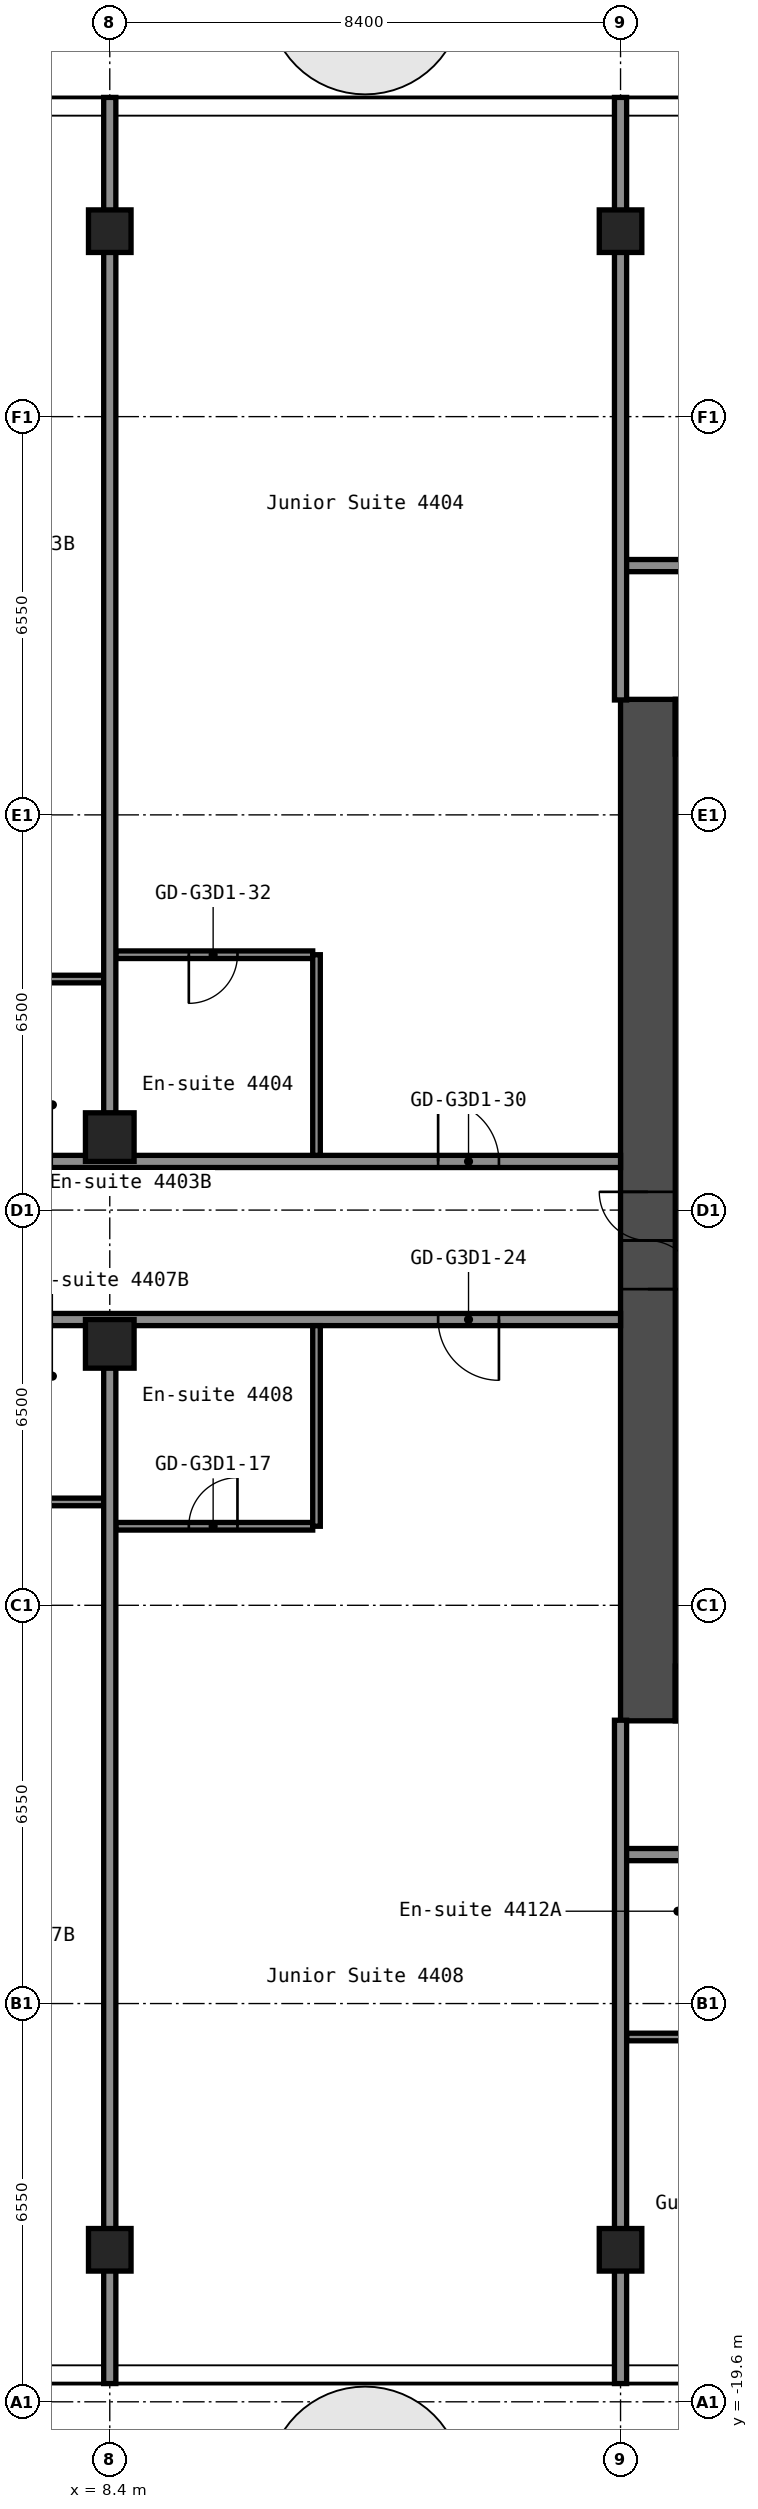
"""IFC4 building model, lengths in metres.
Left out: names, types, materials, properties, quantities, classifications, styles, units other than length and angle.
Written with IfcOpenShell. Run it as: python <this file> out.ifc"""

import sys

from ifc_helpers import new_model, si_unit, direction, frame, frame_2d, origin, origin_2d, place, context, subcontext, project, spatial, rectangle, hollow_rectangle, extrude, element, fill, save


model = new_model("IFC4")
c1 = context("Model", 3, precision=1e-05, world=origin(), true_north=direction((0.0, 1.0)))
c2 = subcontext(c1, "Body", "Model", "MODEL_VIEW")
j1 = project(units=[si_unit("LENGTHUNIT", "METRE"), si_unit("PLANEANGLEUNIT", "RADIAN")], contexts=[c1])
p1 = place(None, origin())
s1 = spatial("IfcSite", under=j1, at=p1, CompositionType="ELEMENT")
p2 = place(p1, origin())
s2 = spatial("IfcBuilding", under=s1, at=p2, CompositionType="ELEMENT")
p3 = place(p2, frame((0.0, 0.0, 156.6)))
s3 = spatial("IfcBuildingStorey", under=s2, at=p3, CompositionType="ELEMENT", Elevation=156.6)
p4 = place(p3, frame((8.4, -17.1, 0.0), z_axis=(0.0, 0.0, 1.0), x_axis=(1.0, 0.0, 0.0)))
e1 = element("IfcColumn", 1, at=p4, inside=s3, PredefinedType="COLUMN", context=c2, shape_type="SweptSolid", body=[
    extrude(hollow_rectangle(XDim=0.7, YDim=0.7, WallThickness=0.028, at=origin_2d()), origin(), (0.0, 0.0, 1.0), 2.75),
])
for number, where, z_axis, x_axis in (
    (2, (8.4, -2.2, 0.0), (0.0, 0.0, 1.0), (1.0, 0.0, 0.0)),
    (3, (8.4, 1.2, 0.0), (0.0, 0.0, 1.0), (1.0, 0.0, 0.0)),
):
    element("IfcColumn", number, at=place(p3, frame(where, z_axis=z_axis, x_axis=x_axis)), inside=s3, PredefinedType="COLUMN", context=c2, shape_type="SweptSolid", body=[
        extrude(hollow_rectangle(XDim=0.8, YDim=0.8, WallThickness=0.032, at=origin_2d()), origin(), (0.0, 0.0, 1.0), 2.75),
    ])
for number, where, z_axis, x_axis in (
    (4, (8.4, 16.1, 0.0), (0.0, 0.0, 1.0), (1.0, 0.0, 0.0)),
    (5, (16.8, -17.1, 0.0), (0.0, 0.0, 1.0), (1.0, 0.0, 0.0)),
    (6, (16.8, 16.1, 0.0), (0.0, 0.0, 1.0), (1.0, 0.0, 0.0)),
):
    element("IfcColumn", number, at=place(p3, frame(where, z_axis=z_axis, x_axis=x_axis)), inside=s3, PredefinedType="COLUMN", context=c2, shape_type="SweptSolid", body=[
        extrude(hollow_rectangle(XDim=0.7, YDim=0.7, WallThickness=0.028, at=origin_2d()), origin(), (0.0, 0.0, 1.0), 2.75),
    ])
p5 = place(p3, frame((17.25, -8.4, 0.0), z_axis=(0.0, 0.0, 1.0), x_axis=(0.0, 1.0, 0.0)))
e7 = element("IfcWall", 7, at=p5, inside=s3, PredefinedType="SHEAR", context=c2, shape_type="SweptSolid", body=[
    extrude(rectangle(XDim=16.8, YDim=0.9, at=frame_2d((8.4, 0.0))), origin(), (0.0, 0.0, 1.0), 2.75),
])
p6 = place(p5, frame((7.1, 0.0, 0.0)))
e8 = element("IfcOpeningElement", 8, at=p6, cuts=e7, PredefinedType="OPENING", context=c2, shape_type="SweptSolid", body=[
    extrude(rectangle(XDim=1.6, YDim=2.1, at=frame_2d((0.8, 1.05))), frame((0.0, 0.46, 0.0), z_axis=(0.0, -1.0, 0.0), x_axis=(1.0, 0.0, 0.0)), (0.0, 0.0, 1.0), 0.92),
])
p7 = place(p3, frame((17.7, 7.95, 0.0), z_axis=(0.0, 0.0, 1.0), x_axis=(1.0, 0.0, 0.0)))
e9 = element("IfcWall", 9, at=p7, inside=s3, PredefinedType="SHEAR", context=c2, shape_type="SweptSolid", body=[
    extrude(rectangle(XDim=15.0, YDim=0.9, at=frame_2d((7.5, 0.0))), origin(), (0.0, 0.0, 1.0), 2.75),
])
p8 = place(p7, frame((10.4, 0.0, 0.0)))
e10 = element("IfcOpeningElement", 10, at=p8, cuts=e9, PredefinedType="OPENING", context=c2, shape_type="SweptSolid", body=[
    extrude(rectangle(XDim=1.2, YDim=2.1, at=frame_2d((0.6, 1.05))), frame((0.0, 0.46, 0.0), z_axis=(0.0, -1.0, 0.0), x_axis=(1.0, 0.0, 0.0)), (0.0, 0.0, 1.0), 0.92),
])
p9 = place(p7, frame((13.35, 0.0, 0.0)))
e11 = element("IfcOpeningElement", 11, at=p9, cuts=e9, PredefinedType="OPENING", context=c2, shape_type="SweptSolid", body=[
    extrude(rectangle(XDim=0.9, YDim=2.1, at=frame_2d((0.45, 1.05))), frame((0.0, 0.46, 0.0), z_axis=(0.0, -1.0, 0.0), x_axis=(1.0, 0.0, 0.0)), (0.0, 0.0, 1.0), 0.92),
])
p10 = place(p3, frame((17.7, -7.95, 0.0), z_axis=(0.0, 0.0, 1.0), x_axis=(1.0, 0.0, 0.0)))
e12 = element("IfcWall", 12, at=p10, inside=s3, PredefinedType="SHEAR", context=c2, shape_type="SweptSolid", body=[
    extrude(rectangle(XDim=15.0, YDim=0.9, at=frame_2d((7.5, 0.0))), origin(), (0.0, 0.0, 1.0), 2.75),
])
p11 = place(p10, frame((2.55, 0.0, 0.0)))
e13 = element("IfcOpeningElement", 13, at=p11, cuts=e12, PredefinedType="OPENING", context=c2, shape_type="SweptSolid", body=[
    extrude(rectangle(XDim=1.0, YDim=2.1, at=frame_2d((0.5, 1.05))), frame((0.0, 0.46, 0.0), z_axis=(0.0, -1.0, 0.0), x_axis=(1.0, 0.0, 0.0)), (0.0, 0.0, 1.0), 0.92),
])
p12 = place(p3, frame((16.9, -13.6, 0.0), z_axis=(0.0, 0.0, 1.0), x_axis=(1.0, 0.0, 0.0)))
e14 = element("IfcWall", 14, at=p12, inside=s3, PredefinedType="PARTITIONING", context=c2, shape_type="SweptSolid", body=[
    extrude(rectangle(XDim=2.338, YDim=0.125, at=frame_2d((1.169, 0.0))), origin(), (0.0, 0.0, 1.0), 2.75),
])
p13 = place(p3, frame((16.8, -10.6, 0.0), z_axis=(0.0, 0.0, 1.0), x_axis=(1.0, 0.0, 0.0)))
e15 = element("IfcWall", 15, at=p13, inside=s3, PredefinedType="PARTITIONING", context=c2, shape_type="SweptSolid", body=[
    extrude(rectangle(XDim=25.9, YDim=0.2, at=frame_2d((12.95, 0.0))), origin(), (0.0, 0.0, 1.0), 2.75),
])
p14 = place(p13, frame((2.85, 0.0, 0.0)))
e16 = element("IfcOpeningElement", 16, at=p14, cuts=e15, PredefinedType="OPENING", context=c2, shape_type="SweptSolid", body=[
    extrude(rectangle(XDim=1.0, YDim=2.1, at=frame_2d((0.5, 1.05))), frame((0.0, 0.11, 0.0), z_axis=(0.0, -1.0, 0.0), x_axis=(1.0, 0.0, 0.0)), (0.0, 0.0, 1.0), 0.22),
])
p15 = place(p13, frame((4.55, 0.0, 0.0)))
e17 = element("IfcOpeningElement", 17, at=p15, cuts=e15, PredefinedType="OPENING", context=c2, shape_type="SweptSolid", body=[
    extrude(rectangle(XDim=1.0, YDim=2.1, at=frame_2d((0.5, 1.05))), frame((0.0, 0.11, 0.0), z_axis=(0.0, -1.0, 0.0), x_axis=(1.0, 0.0, 0.0)), (0.0, 0.0, 1.0), 0.22),
])
p16 = place(p13, frame((13.8, 0.0, 0.0)))
e18 = element("IfcOpeningElement", 18, at=p16, cuts=e15, PredefinedType="OPENING", context=c2, shape_type="SweptSolid", body=[
    extrude(rectangle(XDim=1.0, YDim=2.1, at=frame_2d((0.5, 1.05))), frame((0.0, 0.11, 0.0), z_axis=(0.0, -1.0, 0.0), x_axis=(1.0, 0.0, 0.0)), (0.0, 0.0, 1.0), 0.22),
])
p17 = place(p13, frame((19.75, 0.0, 0.0)))
e19 = element("IfcOpeningElement", 19, at=p17, cuts=e15, PredefinedType="OPENING", context=c2, shape_type="SweptSolid", body=[
    extrude(rectangle(XDim=1.0, YDim=2.1, at=frame_2d((0.5, 1.05))), frame((0.0, 0.11, 0.0), z_axis=(0.0, -1.0, 0.0), x_axis=(1.0, 0.0, 0.0)), (0.0, 0.0, 1.0), 0.22),
])
p18 = place(p13, frame((21.65, 0.0, 0.0)))
e20 = element("IfcOpeningElement", 20, at=p18, cuts=e15, PredefinedType="OPENING", context=c2, shape_type="SweptSolid", body=[
    extrude(rectangle(XDim=1.0, YDim=2.1, at=frame_2d((0.5, 1.05))), frame((0.0, 0.11, 0.0), z_axis=(0.0, -1.0, 0.0), x_axis=(1.0, 0.0, 0.0)), (0.0, 0.0, 1.0), 0.22),
])
p19 = place(p3, frame((8.5, -5.2, 0.0), z_axis=(0.0, 0.0, 1.0), x_axis=(1.0, 0.0, 0.0)))
e21 = element("IfcWall", 21, at=p19, inside=s3, PredefinedType="PARTITIONING", context=c2, shape_type="SweptSolid", body=[
    extrude(rectangle(XDim=3.238, YDim=0.125, at=frame_2d((1.619, 0.0))), origin(), (0.0, 0.0, 1.0), 2.75),
])
p20 = place(p19, frame((1.2, 0.0, 0.0)))
e22 = element("IfcOpeningElement", 22, at=p20, cuts=e21, PredefinedType="OPENING", context=c2, shape_type="SweptSolid", body=[
    extrude(rectangle(XDim=0.8, YDim=2.1, at=frame_2d((0.4, 1.05))), frame((0.0, 0.073, 0.0), z_axis=(0.0, -1.0, 0.0), x_axis=(1.0, 0.0, 0.0)), (0.0, 0.0, 1.0), 0.145),
])
p21 = place(p3, frame((5.962, -4.8, 0.0), z_axis=(0.0, 0.0, 1.0), x_axis=(1.0, 0.0, 0.0)))
e23 = element("IfcWall", 23, at=p21, inside=s3, PredefinedType="PARTITIONING", context=c2, shape_type="SweptSolid", body=[
    extrude(rectangle(XDim=2.338, YDim=0.125, at=frame_2d((1.169, 0.0))), origin(), (0.0, 0.0, 1.0), 2.75),
])
p22 = place(p3, frame((-16.8, -1.8, 0.0), z_axis=(0.0, 0.0, 1.0), x_axis=(1.0, 0.0, 0.0)))
e24 = element("IfcWall", 24, at=p22, inside=s3, PredefinedType="PARTITIONING", context=c2, shape_type="SweptSolid", body=[
    extrude(rectangle(XDim=33.6, YDim=0.2, at=frame_2d((16.8, 0.0))), origin(), (0.0, 0.0, 1.0), 2.75),
])
p23 = place(p22, frame((2.85, 0.0, 0.0)))
e25 = element("IfcOpeningElement", 25, at=p23, cuts=e24, PredefinedType="OPENING", context=c2, shape_type="SweptSolid", body=[
    extrude(rectangle(XDim=1.0, YDim=2.1, at=frame_2d((0.5, 1.05))), frame((0.0, 0.11, 0.0), z_axis=(0.0, -1.0, 0.0), x_axis=(1.0, 0.0, 0.0)), (0.0, 0.0, 1.0), 0.22),
])
p24 = place(p22, frame((4.55, 0.0, 0.0)))
e26 = element("IfcOpeningElement", 26, at=p24, cuts=e24, PredefinedType="OPENING", context=c2, shape_type="SweptSolid", body=[
    extrude(rectangle(XDim=1.0, YDim=2.1, at=frame_2d((0.5, 1.05))), frame((0.0, 0.11, 0.0), z_axis=(0.0, -1.0, 0.0), x_axis=(1.0, 0.0, 0.0)), (0.0, 0.0, 1.0), 0.22),
])
p25 = place(p22, frame((10.385, 0.0, 0.0)))
e27 = element("IfcOpeningElement", 27, at=p25, cuts=e24, PredefinedType="OPENING", context=c2, shape_type="SweptSolid", body=[
    extrude(rectangle(XDim=0.9, YDim=2.1, at=frame_2d((0.45, 1.05))), frame((0.0, 0.11, 0.0), z_axis=(0.0, -1.0, 0.0), x_axis=(1.0, 0.0, 0.0)), (0.0, 0.0, 1.0), 0.22),
])
p26 = place(p22, frame((14.585, 0.0, 0.0)))
e28 = element("IfcOpeningElement", 28, at=p26, cuts=e24, PredefinedType="OPENING", context=c2, shape_type="SweptSolid", body=[
    extrude(rectangle(XDim=0.9, YDim=2.1, at=frame_2d((0.45, 1.05))), frame((0.0, 0.11, 0.0), z_axis=(0.0, -1.0, 0.0), x_axis=(1.0, 0.0, 0.0)), (0.0, 0.0, 1.0), 0.22),
])
p27 = place(p22, frame((19.65, 0.0, 0.0)))
e29 = element("IfcOpeningElement", 29, at=p27, cuts=e24, PredefinedType="OPENING", context=c2, shape_type="SweptSolid", body=[
    extrude(rectangle(XDim=1.0, YDim=2.1, at=frame_2d((0.5, 1.05))), frame((0.0, 0.11, 0.0), z_axis=(0.0, -1.0, 0.0), x_axis=(1.0, 0.0, 0.0)), (0.0, 0.0, 1.0), 0.22),
])
p28 = place(p22, frame((21.35, 0.0, 0.0)))
e30 = element("IfcOpeningElement", 30, at=p28, cuts=e24, PredefinedType="OPENING", context=c2, shape_type="SweptSolid", body=[
    extrude(rectangle(XDim=1.0, YDim=2.1, at=frame_2d((0.5, 1.05))), frame((0.0, 0.11, 0.0), z_axis=(0.0, -1.0, 0.0), x_axis=(1.0, 0.0, 0.0)), (0.0, 0.0, 1.0), 0.22),
])
p29 = place(p22, frame((30.6, 0.0, 0.0)))
e31 = element("IfcOpeningElement", 31, at=p29, cuts=e24, PredefinedType="OPENING", context=c2, shape_type="SweptSolid", body=[
    extrude(rectangle(XDim=1.0, YDim=2.1, at=frame_2d((0.5, 1.05))), frame((0.0, 0.11, 0.0), z_axis=(0.0, -1.0, 0.0), x_axis=(1.0, 0.0, 0.0)), (0.0, 0.0, 1.0), 0.22),
])
p30 = place(p3, frame((-16.8, 0.8, 0.0), z_axis=(0.0, 0.0, 1.0), x_axis=(1.0, 0.0, 0.0)))
e32 = element("IfcWall", 32, at=p30, inside=s3, PredefinedType="PARTITIONING", context=c2, shape_type="SweptSolid", body=[
    extrude(rectangle(XDim=33.6, YDim=0.2, at=frame_2d((16.8, 0.0))), origin(), (0.0, 0.0, 1.0), 2.75),
])
p31 = place(p30, frame((2.85, 0.0, 0.0)))
e33 = element("IfcOpeningElement", 33, at=p31, cuts=e32, PredefinedType="OPENING", context=c2, shape_type="SweptSolid", body=[
    extrude(rectangle(XDim=1.0, YDim=2.1, at=frame_2d((0.5, 1.05))), frame((0.0, 0.11, 0.0), z_axis=(0.0, -1.0, 0.0), x_axis=(1.0, 0.0, 0.0)), (0.0, 0.0, 1.0), 0.22),
])
p32 = place(p30, frame((4.55, 0.0, 0.0)))
e34 = element("IfcOpeningElement", 34, at=p32, cuts=e32, PredefinedType="OPENING", context=c2, shape_type="SweptSolid", body=[
    extrude(rectangle(XDim=1.0, YDim=2.1, at=frame_2d((0.5, 1.05))), frame((0.0, 0.11, 0.0), z_axis=(0.0, -1.0, 0.0), x_axis=(1.0, 0.0, 0.0)), (0.0, 0.0, 1.0), 0.22),
])
p33 = place(p30, frame((10.4, 0.0, 0.0)))
e35 = element("IfcOpeningElement", 35, at=p33, cuts=e32, PredefinedType="OPENING", context=c2, shape_type="SweptSolid", body=[
    extrude(rectangle(XDim=1.0, YDim=2.1, at=frame_2d((0.5, 1.05))), frame((0.0, 0.11, 0.0), z_axis=(0.0, -1.0, 0.0), x_axis=(1.0, 0.0, 0.0)), (0.0, 0.0, 1.0), 0.22),
])
p34 = place(p30, frame((19.65, 0.0, 0.0)))
e36 = element("IfcOpeningElement", 36, at=p34, cuts=e32, PredefinedType="OPENING", context=c2, shape_type="SweptSolid", body=[
    extrude(rectangle(XDim=1.0, YDim=2.1, at=frame_2d((0.5, 1.05))), frame((0.0, 0.11, 0.0), z_axis=(0.0, -1.0, 0.0), x_axis=(1.0, 0.0, 0.0)), (0.0, 0.0, 1.0), 0.22),
])
p35 = place(p30, frame((21.35, 0.0, 0.0)))
e37 = element("IfcOpeningElement", 37, at=p35, cuts=e32, PredefinedType="OPENING", context=c2, shape_type="SweptSolid", body=[
    extrude(rectangle(XDim=1.0, YDim=2.1, at=frame_2d((0.5, 1.05))), frame((0.0, 0.11, 0.0), z_axis=(0.0, -1.0, 0.0), x_axis=(1.0, 0.0, 0.0)), (0.0, 0.0, 1.0), 0.22),
])
p36 = place(p30, frame((30.6, 0.0, 0.0)))
e38 = element("IfcOpeningElement", 38, at=p36, cuts=e32, PredefinedType="OPENING", context=c2, shape_type="SweptSolid", body=[
    extrude(rectangle(XDim=1.0, YDim=2.1, at=frame_2d((0.5, 1.05))), frame((0.0, 0.11, 0.0), z_axis=(0.0, -1.0, 0.0), x_axis=(1.0, 0.0, 0.0)), (0.0, 0.0, 1.0), 0.22),
])
p37 = place(p3, frame((5.962, 3.8, 0.0), z_axis=(0.0, 0.0, 1.0), x_axis=(1.0, 0.0, 0.0)))
e39 = element("IfcWall", 39, at=p37, inside=s3, PredefinedType="PARTITIONING", context=c2, shape_type="SweptSolid", body=[
    extrude(rectangle(XDim=2.338, YDim=0.125, at=frame_2d((1.169, 0.0))), origin(), (0.0, 0.0, 1.0), 2.75),
])
p38 = place(p3, frame((8.5, 4.2, 0.0), z_axis=(0.0, 0.0, 1.0), x_axis=(1.0, 0.0, 0.0)))
e40 = element("IfcWall", 40, at=p38, inside=s3, PredefinedType="PARTITIONING", context=c2, shape_type="SweptSolid", body=[
    extrude(rectangle(XDim=3.238, YDim=0.125, at=frame_2d((1.619, 0.0))), origin(), (0.0, 0.0, 1.0), 2.75),
])
p39 = place(p38, frame((1.2, 0.0, 0.0)))
e41 = element("IfcOpeningElement", 41, at=p39, cuts=e40, PredefinedType="OPENING", context=c2, shape_type="SweptSolid", body=[
    extrude(rectangle(XDim=0.8, YDim=2.1, at=frame_2d((0.4, 1.05))), frame((0.0, 0.073, 0.0), z_axis=(0.0, -1.0, 0.0), x_axis=(1.0, 0.0, 0.0)), (0.0, 0.0, 1.0), 0.145),
])
p40 = place(p3, frame((16.8, 10.6, 0.0), z_axis=(0.0, 0.0, 1.0), x_axis=(1.0, 0.0, 0.0)))
e42 = element("IfcWall", 42, at=p40, inside=s3, PredefinedType="PARTITIONING", context=c2, shape_type="SweptSolid", body=[
    extrude(rectangle(XDim=25.9, YDim=0.2, at=frame_2d((12.95, 0.0))), origin(), (0.0, 0.0, 1.0), 2.75),
])
p41 = place(p40, frame((3.4, 0.0, 0.0)))
e43 = element("IfcOpeningElement", 43, at=p41, cuts=e42, PredefinedType="OPENING", context=c2, shape_type="SweptSolid", body=[
    extrude(rectangle(XDim=1.6, YDim=2.1, at=frame_2d((0.8, 1.05))), frame((0.0, 0.11, 0.0), z_axis=(0.0, -1.0, 0.0), x_axis=(1.0, 0.0, 0.0)), (0.0, 0.0, 1.0), 0.22),
])
p42 = place(p40, frame((11.8, 0.0, 0.0)))
e44 = element("IfcOpeningElement", 44, at=p42, cuts=e42, PredefinedType="OPENING", context=c2, shape_type="SweptSolid", body=[
    extrude(rectangle(XDim=1.6, YDim=2.1, at=frame_2d((0.8, 1.05))), frame((0.0, 0.11, 0.0), z_axis=(0.0, -1.0, 0.0), x_axis=(1.0, 0.0, 0.0)), (0.0, 0.0, 1.0), 0.22),
])
p43 = place(p40, frame((20.4, 0.0, 0.0)))
e45 = element("IfcOpeningElement", 45, at=p43, cuts=e42, PredefinedType="OPENING", context=c2, shape_type="SweptSolid", body=[
    extrude(rectangle(XDim=1.6, YDim=2.1, at=frame_2d((0.8, 1.05))), frame((0.0, 0.11, 0.0), z_axis=(0.0, -1.0, 0.0), x_axis=(1.0, 0.0, 0.0)), (0.0, 0.0, 1.0), 0.22),
])
for number, where, z_axis, x_axis in (
    (46, (8.4, -19.3, 0.0), (0.0, 0.0, 1.0), (0.0, 1.0, 0.0)),
    (47, (8.4, 1.59, 0.0), (0.0, 0.0, 1.0), (0.0, 1.0, 0.0)),
):
    element("IfcWall", number, at=place(p3, frame(where, z_axis=z_axis, x_axis=x_axis)), inside=s3, PredefinedType="PARTITIONING", context=c2, shape_type="SweptSolid", body=[
        extrude(rectangle(XDim=16.71, YDim=0.2, at=frame_2d((8.355, 0.0))), origin(), (0.0, 0.0, 1.0), 2.75),
    ])
for number, where, z_axis, x_axis in (
    (48, (11.8, -5.2, 0.0), (0.0, 0.0, 1.0), (0.0, 1.0, 0.0)),
    (49, (11.8, 0.9, 0.0), (0.0, 0.0, 1.0), (0.0, 1.0, 0.0)),
):
    element("IfcWall", number, at=place(p3, frame(where, z_axis=z_axis, x_axis=x_axis)), inside=s3, PredefinedType="PARTITIONING", context=c2, shape_type="SweptSolid", body=[
        extrude(rectangle(XDim=3.3, YDim=0.125, at=frame_2d((1.65, 0.0))), origin(), (0.0, 0.0, 1.0), 2.75),
    ])
p44 = place(p3, frame((16.8, -19.3, 0.0), z_axis=(0.0, 0.0, 1.0), x_axis=(0.0, 1.0, 0.0)))
e50 = element("IfcWall", 50, at=p44, inside=s3, PredefinedType="PARTITIONING", context=c2, shape_type="SweptSolid", body=[
    extrude(rectangle(XDim=10.91, YDim=0.2, at=frame_2d((5.455, 0.0))), origin(), (0.0, 0.0, 1.0), 2.75),
])
p45 = place(p3, frame((16.8, 8.39, 0.0), z_axis=(0.0, 0.0, 1.0), x_axis=(0.0, 1.0, 0.0)))
e51 = element("IfcWall", 51, at=p45, inside=s3, PredefinedType="PARTITIONING", context=c2, shape_type="SweptSolid", body=[
    extrude(rectangle(XDim=9.91, YDim=0.2, at=frame_2d((4.955, 0.0))), origin(), (0.0, 0.0, 1.0), 2.75),
])
p46 = place(p6, origin())
e52 = element("IfcDoor", 52, at=p46, inside=s3, OperationType="DOUBLE_DOOR_SINGLE_SWING", PredefinedType="DOOR", context=c2, shape_type="SweptSolid", body=[
    extrude(rectangle(XDim=1.6, YDim=2.1, at=frame_2d((0.8, 1.05))), frame((0.0, 0.025, 0.0), z_axis=(0.0, -1.0, 0.0), x_axis=(1.0, 0.0, 0.0)), (0.0, 0.0, 1.0), 0.05),
])
fill(e8, e52)
p47 = place(p20, origin())
e53 = element("IfcDoor", 53, at=p47, inside=s3, OperationType="SINGLE_SWING_LEFT", PredefinedType="DOOR", context=c2, shape_type="SweptSolid", body=[
    extrude(rectangle(XDim=0.8, YDim=2.1, at=frame_2d((0.4, 1.05))), frame((0.0, 0.025, 0.0), z_axis=(0.0, -1.0, 0.0), x_axis=(1.0, 0.0, 0.0)), (0.0, 0.0, 1.0), 0.05),
])
fill(e22, e53)
p48 = place(p29, origin())
e54 = element("IfcDoor", 54, at=p48, inside=s3, OperationType="SINGLE_SWING_RIGHT", PredefinedType="DOOR", context=c2, shape_type="SweptSolid", body=[
    extrude(rectangle(XDim=1.0, YDim=2.1, at=frame_2d((0.5, 1.05))), frame((0.0, 0.025, 0.0), z_axis=(0.0, -1.0, 0.0), x_axis=(1.0, 0.0, 0.0)), (0.0, 0.0, 1.0), 0.05),
])
fill(e31, e54)
p49 = place(p36, origin())
e55 = element("IfcDoor", 55, at=p49, inside=s3, OperationType="SINGLE_SWING_RIGHT", PredefinedType="DOOR", context=c2, shape_type="SweptSolid", body=[
    extrude(rectangle(XDim=1.0, YDim=2.1, at=frame_2d((0.5, 1.05))), frame((0.0, 0.025, 0.0), z_axis=(0.0, -1.0, 0.0), x_axis=(1.0, 0.0, 0.0)), (0.0, 0.0, 1.0), 0.05),
])
fill(e38, e55)
p50 = place(p39, origin())
e56 = element("IfcDoor", 56, at=p50, inside=s3, OperationType="SINGLE_SWING_LEFT", PredefinedType="DOOR", context=c2, shape_type="SweptSolid", body=[
    extrude(rectangle(XDim=0.8, YDim=2.1, at=frame_2d((0.4, 1.05))), frame((0.0, 0.025, 0.0), z_axis=(0.0, -1.0, 0.0), x_axis=(1.0, 0.0, 0.0)), (0.0, 0.0, 1.0), 0.05),
])
fill(e41, e56)
save(model, sys.argv[1])
